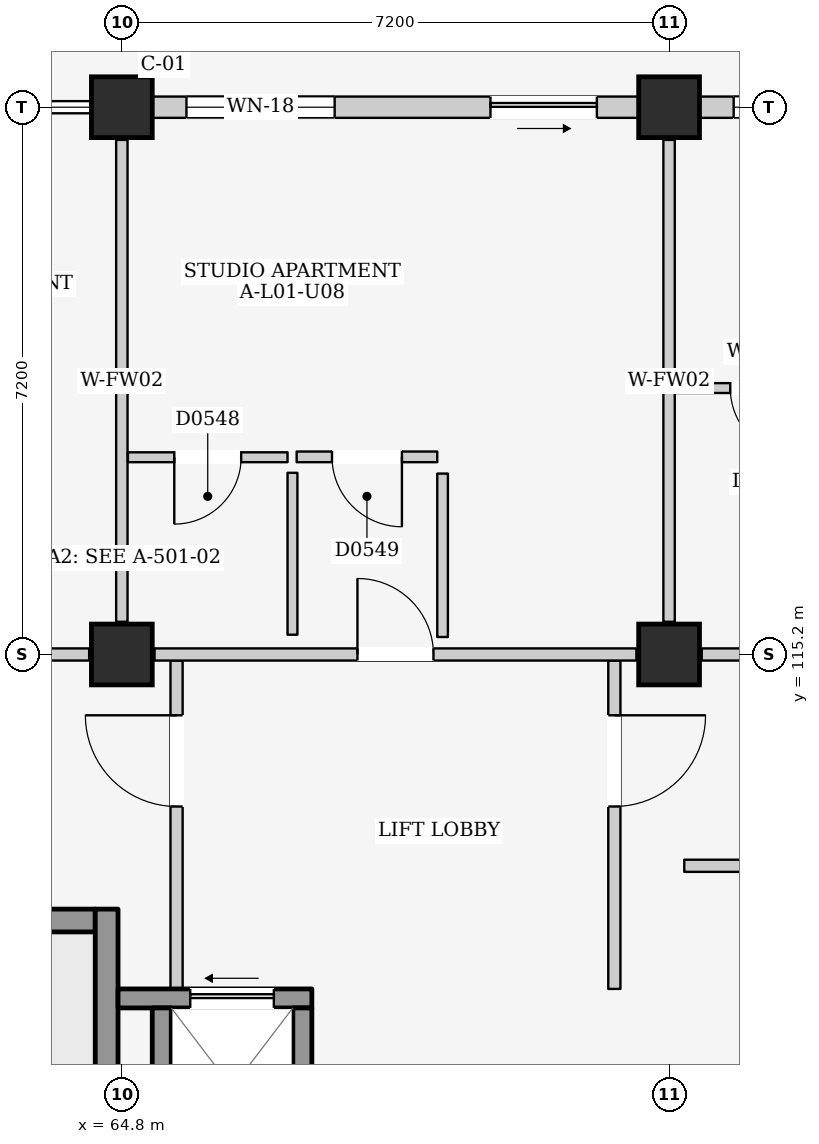
"""IFC4 building model, lengths in metres.
Left out: names, types, materials, properties, quantities, classifications, styles, units other than length and angle.
Written with IfcOpenShell. Run it as: python <this file> out.ifc"""

import sys

from ifc_helpers import new_model, si_unit, direction, frame, frame_2d, origin, origin_2d, place, context, subcontext, project, spatial, rectangle, extrude, element, fill, save


model = new_model("IFC4")
c1 = context("Model", 3, precision=1e-05, world=origin(), true_north=direction((0.0, 1.0)))
c2 = subcontext(c1, "Body", "Model", "MODEL_VIEW")
j1 = project(units=[si_unit("LENGTHUNIT", "METRE"), si_unit("PLANEANGLEUNIT", "RADIAN")], contexts=[c1])
p1 = place(None, origin())
s1 = spatial("IfcSite", under=j1, at=p1, CompositionType="ELEMENT")
p2 = place(p1, origin())
s2 = spatial("IfcBuilding", under=s1, at=p2, CompositionType="ELEMENT")
p3 = place(p2, frame((0.0, 0.0, 4.5)))
s3 = spatial("IfcBuildingStorey", under=s2, at=p3, CompositionType="ELEMENT", Elevation=4.5)
for number, where, z_axis, x_axis in (
    (1, (64.8, 115.2, 0.0), (0.0, 0.0, 1.0), (1.0, 0.0, 0.0)),
    (2, (64.8, 122.4, 0.0), (0.0, 0.0, 1.0), (1.0, 0.0, 0.0)),
    (3, (72.0, 115.2, 0.0), (0.0, 0.0, 1.0), (1.0, 0.0, 0.0)),
    (4, (72.0, 122.4, 0.0), (0.0, 0.0, 1.0), (1.0, 0.0, 0.0)),
):
    element("IfcColumn", number, at=place(p3, frame(where, z_axis=z_axis, x_axis=x_axis)), inside=s3, PredefinedType="COLUMN", context=c2, shape_type="SweptSolid", body=[
        extrude(rectangle(XDim=0.8, YDim=0.8, at=origin_2d()), origin(), (0.0, 0.0, 1.0), 4.5),
    ])
p4 = place(p3, frame((65.2, 122.4, 0.0), z_axis=(0.0, 0.0, 1.0), x_axis=(1.0, 0.0, 0.0)))
e5 = element("IfcWall", 5, at=p4, inside=s3, PredefinedType="ELEMENTEDWALL", context=c2, shape_type="SweptSolid", body=[
    extrude(rectangle(XDim=6.4, YDim=0.28, at=frame_2d((3.2, 0.0))), origin(), (0.0, 0.0, 1.0), 3.715),
])
p5 = place(p4, frame((4.45, 0.0, 0.0)))
e6 = element("IfcOpeningElement", 6, at=p5, cuts=e5, PredefinedType="OPENING", context=c2, shape_type="SweptSolid", body=[
    extrude(rectangle(XDim=1.4, YDim=2.1, at=frame_2d((0.7, 1.05))), frame((0.0, 0.155, 0.0), z_axis=(0.0, -1.0, 0.0), x_axis=(1.0, 0.0, 0.0)), (0.0, 0.0, 1.0), 0.31),
])
p6 = place(p4, frame((0.45, 0.0, 0.9)))
e7 = element("IfcOpeningElement", 7, at=p6, cuts=e5, PredefinedType="OPENING", context=c2, shape_type="SweptSolid", body=[
    extrude(rectangle(XDim=1.95, YDim=1.55, at=frame_2d((0.975, 0.775))), frame((0.0, 0.155, 0.0), z_axis=(0.0, -1.0, 0.0), x_axis=(1.0, 0.0, 0.0)), (0.0, 0.0, 1.0), 0.31),
])
p7 = place(p3, frame((72.4, 122.4, 0.0), z_axis=(0.0, 0.0, 1.0), x_axis=(1.0, 0.0, 0.0)))
e8 = element("IfcWall", 8, at=p7, inside=s3, PredefinedType="ELEMENTEDWALL", context=c2, shape_type="SweptSolid", body=[
    extrude(rectangle(XDim=6.4, YDim=0.28, at=frame_2d((3.2, 0.0))), origin(), (0.0, 0.0, 1.0), 3.715),
])
p8 = place(p7, frame((4.05, 0.0, 0.0)))
e9 = element("IfcOpeningElement", 9, at=p8, cuts=e8, PredefinedType="OPENING", context=c2, shape_type="SweptSolid", body=[
    extrude(rectangle(XDim=1.8, YDim=2.12, at=frame_2d((0.9, 1.06))), frame((0.0, 0.155, 0.0), z_axis=(0.0, -1.0, 0.0), x_axis=(1.0, 0.0, 0.0)), (0.0, 0.0, 1.0), 0.31),
])
p9 = place(p7, frame((0.45, 0.0, 0.9)))
e10 = element("IfcOpeningElement", 10, at=p9, cuts=e8, PredefinedType="OPENING", context=c2, shape_type="SweptSolid", body=[
    extrude(rectangle(XDim=1.65, YDim=1.35, at=frame_2d((0.825, 0.675))), frame((0.0, 0.155, 0.0), z_axis=(0.0, -1.0, 0.0), x_axis=(1.0, 0.0, 0.0)), (0.0, 0.0, 1.0), 0.31),
])
p10 = place(p3, frame((57.95, 111.7, 0.0), z_axis=(0.0, 0.0, 1.0), x_axis=(1.0, 0.0, 0.0)))
e11 = element("IfcWall", 11, at=p10, inside=s3, PredefinedType="SHEAR", context=c2, shape_type="SweptSolid", body=[
    extrude(rectangle(XDim=6.5, YDim=0.3, at=frame_2d((3.25, 0.0))), origin(), (0.0, 0.0, 1.0), 4.25),
])
p11 = place(p10, frame((0.18, 0.0, 0.0)))
e12 = element("IfcOpeningElement", 12, at=p11, cuts=e11, PredefinedType="OPENING", context=c2, shape_type="SweptSolid", body=[
    extrude(rectangle(XDim=1.15, YDim=2.2, at=frame_2d((0.575, 1.1))), frame((0.0, 0.165, 0.0), z_axis=(0.0, -1.0, 0.0), x_axis=(1.0, 0.0, 0.0)), (0.0, 0.0, 1.0), 0.33),
])
p12 = place(p3, frame((64.6, 108.15, 0.0), z_axis=(0.0, 0.0, 1.0), x_axis=(0.0, 1.0, 0.0)))
e13 = element("IfcWall", 13, at=p12, inside=s3, PredefinedType="SHEAR", context=c2, shape_type="SweptSolid", body=[
    extrude(rectangle(XDim=3.7, YDim=0.3, at=frame_2d((1.85, 0.0))), origin(), (0.0, 0.0, 1.0), 4.25),
])
p13 = place(p3, frame((65.52, 110.8, 0.0), z_axis=(0.0, 0.0, 1.0), x_axis=(0.0, 1.0, 0.0)))
e14 = element("IfcWall", 14, at=p13, inside=s3, PredefinedType="PARTITIONING", context=c2, shape_type="SweptSolid", body=[
    extrude(rectangle(XDim=4.32, YDim=0.16, at=frame_2d((2.16, 0.0))), origin(), (0.0, 0.0, 1.0), 4.25),
])
p14 = place(p13, frame((2.4, 0.0, 0.0)))
e15 = element("IfcOpeningElement", 15, at=p14, cuts=e14, PredefinedType="OPENING", context=c2, shape_type="SweptSolid", body=[
    extrude(rectangle(XDim=1.2, YDim=2.2, at=frame_2d((0.6, 1.1))), frame((0.0, 0.095, 0.0), z_axis=(0.0, -1.0, 0.0), x_axis=(1.0, 0.0, 0.0)), (0.0, 0.0, 1.0), 0.19),
])
p15 = place(p3, frame((71.28, 110.8, 0.0), z_axis=(0.0, 0.0, 1.0), x_axis=(0.0, 1.0, 0.0)))
e16 = element("IfcWall", 16, at=p15, inside=s3, PredefinedType="PARTITIONING", context=c2, shape_type="SweptSolid", body=[
    extrude(rectangle(XDim=4.32, YDim=0.16, at=frame_2d((2.16, 0.0))), origin(), (0.0, 0.0, 1.0), 4.25),
])
p16 = place(p15, frame((2.4, 0.0, 0.0)))
e17 = element("IfcOpeningElement", 17, at=p16, cuts=e16, PredefinedType="OPENING", context=c2, shape_type="SweptSolid", body=[
    extrude(rectangle(XDim=1.2, YDim=2.2, at=frame_2d((0.6, 1.1))), frame((0.0, 0.095, 0.0), z_axis=(0.0, -1.0, 0.0), x_axis=(1.0, 0.0, 0.0)), (0.0, 0.0, 1.0), 0.19),
])
p17 = place(p3, frame((64.75, 110.675, 0.0), z_axis=(0.0, 0.0, 1.0), x_axis=(1.0, 0.0, 0.0)))
e18 = element("IfcWall", 18, at=p17, inside=s3, PredefinedType="SHEAR", context=c2, shape_type="SweptSolid", body=[
    extrude(rectangle(XDim=2.55, YDim=0.25, at=frame_2d((1.275, 0.0))), origin(), (0.0, 0.0, 1.0), 4.25),
])
p18 = place(p17, frame((0.95, 0.0, 0.0)))
e19 = element("IfcOpeningElement", 19, at=p18, cuts=e18, PredefinedType="OPENING", context=c2, shape_type="SweptSolid", body=[
    extrude(rectangle(XDim=1.1, YDim=2.15, at=frame_2d((0.55, 1.075))), frame((0.0, 0.14, 0.0), z_axis=(0.0, -1.0, 0.0), x_axis=(1.0, 0.0, 0.0)), (0.0, 0.0, 1.0), 0.28),
])
for number, where, z_axis, x_axis in (
    (20, (65.325, 108.45, 0.0), (0.0, 0.0, 1.0), (0.0, 1.0, 0.0)),
    (21, (67.175, 108.45, 0.0), (0.0, 0.0, 1.0), (0.0, 1.0, 0.0)),
):
    element("IfcWall", number, at=place(p3, frame(where, z_axis=z_axis, x_axis=x_axis)), inside=s3, PredefinedType="SHEAR", context=c2, shape_type="SweptSolid", body=[
        extrude(rectangle(XDim=2.1, YDim=0.25, at=frame_2d((1.05, 0.0))), origin(), (0.0, 0.0, 1.0), 4.25),
    ])
p19 = place(p3, frame((58.03, 115.2, 0.0), z_axis=(0.0, 0.0, 1.0), x_axis=(1.0, 0.0, 0.0)))
e22 = element("IfcWall", 22, at=p19, inside=s3, PredefinedType="PARTITIONING", context=c2, shape_type="SweptSolid", body=[
    extrude(rectangle(XDim=6.34, YDim=0.16, at=frame_2d((3.17, 0.0))), origin(), (0.0, 0.0, 1.0), 3.585),
])
p20 = place(p19, frame((2.67, 0.0, 0.0)))
e23 = element("IfcOpeningElement", 23, at=p20, cuts=e22, PredefinedType="OPENING", context=c2, shape_type="SweptSolid", body=[
    extrude(rectangle(XDim=1.0, YDim=2.15, at=frame_2d((0.5, 1.075))), frame((0.0, 0.095, 0.0), z_axis=(0.0, -1.0, 0.0), x_axis=(1.0, 0.0, 0.0)), (0.0, 0.0, 1.0), 0.19),
])
p21 = place(p3, frame((64.8, 115.63, 0.0), z_axis=(0.0, 0.0, 1.0), x_axis=(0.0, 1.0, 0.0)))
e24 = element("IfcWall", 24, at=p21, inside=s3, PredefinedType="PARTITIONING", context=c2, shape_type="SweptSolid", body=[
    extrude(rectangle(XDim=6.34, YDim=0.15, at=frame_2d((3.17, 0.0))), origin(), (0.0, 0.0, 1.0), 3.685),
])
p22 = place(p3, frame((65.23, 115.2, 0.0), z_axis=(0.0, 0.0, 1.0), x_axis=(1.0, 0.0, 0.0)))
e25 = element("IfcWall", 25, at=p22, inside=s3, PredefinedType="PARTITIONING", context=c2, shape_type="SweptSolid", body=[
    extrude(rectangle(XDim=6.34, YDim=0.16, at=frame_2d((3.17, 0.0))), origin(), (0.0, 0.0, 1.0), 3.585),
])
p23 = place(p22, frame((2.67, 0.0, 0.0)))
e26 = element("IfcOpeningElement", 26, at=p23, cuts=e25, PredefinedType="OPENING", context=c2, shape_type="SweptSolid", body=[
    extrude(rectangle(XDim=1.0, YDim=2.15, at=frame_2d((0.5, 1.075))), frame((0.0, 0.095, 0.0), z_axis=(0.0, -1.0, 0.0), x_axis=(1.0, 0.0, 0.0)), (0.0, 0.0, 1.0), 0.19),
])
p24 = place(p3, frame((72.0, 115.63, 0.0), z_axis=(0.0, 0.0, 1.0), x_axis=(0.0, 1.0, 0.0)))
e27 = element("IfcWall", 27, at=p24, inside=s3, PredefinedType="PARTITIONING", context=c2, shape_type="SweptSolid", body=[
    extrude(rectangle(XDim=6.34, YDim=0.15, at=frame_2d((3.17, 0.0))), origin(), (0.0, 0.0, 1.0), 3.685),
])
p25 = place(p3, frame((64.88, 117.795, 0.0), z_axis=(0.0, 0.0, 1.0), x_axis=(1.0, 0.0, 0.0)))
e28 = element("IfcWall", 28, at=p25, inside=s3, PredefinedType="PARTITIONING", context=c2, shape_type="SweptSolid", body=[
    extrude(rectangle(XDim=2.1, YDim=0.13, at=frame_2d((1.05, 0.0))), origin(), (0.0, 0.0, 1.0), 4.25),
])
p26 = place(p25, frame((0.61, 0.0, 0.0)))
e29 = element("IfcOpeningElement", 29, at=p26, cuts=e28, PredefinedType="OPENING", context=c2, shape_type="SweptSolid", body=[
    extrude(rectangle(XDim=0.88, YDim=2.1, at=frame_2d((0.44, 1.05))), frame((0.0, 0.08, 0.0), z_axis=(0.0, -1.0, 0.0), x_axis=(1.0, 0.0, 0.0)), (0.0, 0.0, 1.0), 0.16),
])
p27 = place(p3, frame((67.045, 115.46, 0.0), z_axis=(0.0, 0.0, 1.0), x_axis=(0.0, 1.0, 0.0)))
e30 = element("IfcWall", 30, at=p27, inside=s3, PredefinedType="PARTITIONING", context=c2, shape_type="SweptSolid", body=[
    extrude(rectangle(XDim=2.13, YDim=0.13, at=frame_2d((1.065, 0.0))), origin(), (0.0, 0.0, 1.0), 4.25),
])
p28 = place(p3, frame((67.1, 117.8, 0.0), z_axis=(0.0, 0.0, 1.0), x_axis=(1.0, 0.0, 0.0)))
e31 = element("IfcWall", 31, at=p28, inside=s3, PredefinedType="PARTITIONING", context=c2, shape_type="SweptSolid", body=[
    extrude(rectangle(XDim=1.85, YDim=0.14, at=frame_2d((0.925, 0.0))), origin(), (0.0, 0.0, 1.0), 4.25),
])
p29 = place(p28, frame((0.465, 0.0, 0.0)))
e32 = element("IfcOpeningElement", 32, at=p29, cuts=e31, PredefinedType="OPENING", context=c2, shape_type="SweptSolid", body=[
    extrude(rectangle(XDim=0.92, YDim=2.1, at=frame_2d((0.46, 1.05))), frame((0.0, 0.085, 0.0), z_axis=(0.0, -1.0, 0.0), x_axis=(1.0, 0.0, 0.0)), (0.0, 0.0, 1.0), 0.17),
])
p30 = place(p3, frame((69.02, 115.43, 0.0), z_axis=(0.0, 0.0, 1.0), x_axis=(0.0, 1.0, 0.0)))
e33 = element("IfcWall", 33, at=p30, inside=s3, PredefinedType="PARTITIONING", context=c2, shape_type="SweptSolid", body=[
    extrude(rectangle(XDim=2.15, YDim=0.14, at=frame_2d((1.075, 0.0))), origin(), (0.0, 0.0, 1.0), 4.25),
])
p31 = place(p3, frame((72.43, 115.2, 0.0), z_axis=(0.0, 0.0, 1.0), x_axis=(1.0, 0.0, 0.0)))
e34 = element("IfcWall", 34, at=p31, inside=s3, PredefinedType="PARTITIONING", context=c2, shape_type="SweptSolid", body=[
    extrude(rectangle(XDim=6.34, YDim=0.16, at=frame_2d((3.17, 0.0))), origin(), (0.0, 0.0, 1.0), 3.585),
])
p32 = place(p31, frame((5.16, 0.0, 0.0)))
e35 = element("IfcOpeningElement", 35, at=p32, cuts=e34, PredefinedType="OPENING", context=c2, shape_type="SweptSolid", body=[
    extrude(rectangle(XDim=1.0, YDim=2.15, at=frame_2d((0.5, 1.075))), frame((0.0, 0.095, 0.0), z_axis=(0.0, -1.0, 0.0), x_axis=(1.0, 0.0, 0.0)), (0.0, 0.0, 1.0), 0.19),
])
p33 = place(p3, frame((72.08, 118.705, 0.0), z_axis=(0.0, 0.0, 1.0), x_axis=(1.0, 0.0, 0.0)))
e36 = element("IfcWall", 36, at=p33, inside=s3, PredefinedType="PARTITIONING", context=c2, shape_type="SweptSolid", body=[
    extrude(rectangle(XDim=2.35, YDim=0.13, at=frame_2d((1.175, 0.0))), origin(), (0.0, 0.0, 1.0), 4.25),
])
p34 = place(p33, frame((0.725, 0.0, 0.0)))
e37 = element("IfcOpeningElement", 37, at=p34, cuts=e36, PredefinedType="OPENING", context=c2, shape_type="SweptSolid", body=[
    extrude(rectangle(XDim=0.9, YDim=2.1, at=frame_2d((0.45, 1.05))), frame((0.0, 0.08, 0.0), z_axis=(0.0, -1.0, 0.0), x_axis=(1.0, 0.0, 0.0)), (0.0, 0.0, 1.0), 0.16),
])
p35 = place(p3, frame((72.2, 112.42, 0.0), z_axis=(0.0, 0.0, 1.0), x_axis=(1.0, 0.0, 0.0)))
e38 = element("IfcWall", 38, at=p35, inside=s3, PredefinedType="PARTITIONING", context=c2, shape_type="SweptSolid", body=[
    extrude(rectangle(XDim=6.8, YDim=0.16, at=frame_2d((3.4, 0.0))), origin(), (0.0, 0.0, 1.0), 4.25),
])
p36 = place(p35, frame((2.93, 0.0, 0.0)))
e39 = element("IfcOpeningElement", 39, at=p36, cuts=e38, PredefinedType="OPENING", context=c2, shape_type="SweptSolid", body=[
    extrude(rectangle(XDim=0.94, YDim=2.12, at=frame_2d((0.47, 1.06))), frame((0.0, 0.095, 0.0), z_axis=(0.0, -1.0, 0.0), x_axis=(1.0, 0.0, 0.0)), (0.0, 0.0, 1.0), 0.19),
])
p37 = place(p5, frame((1.4, 0.0, 0.0), z_axis=(0.0, 0.0, 1.0), x_axis=(-1.0, 0.0, 0.0)))
e40 = element("IfcDoor", 40, at=p37, inside=s3, OperationType="SLIDING_TO_RIGHT", PredefinedType="DOOR", context=c2, shape_type="SweptSolid", body=[
    extrude(rectangle(XDim=1.4, YDim=2.1, at=frame_2d((0.7, 1.05))), frame((0.0, 0.025, 0.0), z_axis=(0.0, -1.0, 0.0), x_axis=(1.0, 0.0, 0.0)), (0.0, 0.0, 1.0), 0.05),
])
fill(e6, e40)
p38 = place(p6, origin())
e41 = element("IfcWindow", 41, at=p38, inside=s3, PartitioningType="DOUBLE_PANEL_VERTICAL", PredefinedType="WINDOW", context=c2, shape_type="SweptSolid", body=[
    extrude(rectangle(XDim=1.95, YDim=1.55, at=frame_2d((0.975, 0.775))), frame((0.0, 0.03, 0.0), z_axis=(0.0, -1.0, 0.0), x_axis=(1.0, 0.0, 0.0)), (0.0, 0.0, 1.0), 0.06),
])
fill(e7, e41)
p39 = place(p9, origin())
e42 = element("IfcWindow", 42, at=p39, inside=s3, PartitioningType="DOUBLE_PANEL_VERTICAL", PredefinedType="WINDOW", context=c2, shape_type="SweptSolid", body=[
    extrude(rectangle(XDim=1.65, YDim=1.35, at=frame_2d((0.825, 0.675))), frame((0.0, 0.03, 0.0), z_axis=(0.0, -1.0, 0.0), x_axis=(1.0, 0.0, 0.0)), (0.0, 0.0, 1.0), 0.06),
])
fill(e10, e42)
p40 = place(p14, origin())
e43 = element("IfcDoor", 43, at=p40, inside=s3, OperationType="SINGLE_SWING_RIGHT", PredefinedType="DOOR", context=c2, shape_type="SweptSolid", body=[
    extrude(rectangle(XDim=1.2, YDim=2.2, at=frame_2d((0.6, 1.1))), frame((0.0, 0.025, 0.0), z_axis=(0.0, -1.0, 0.0), x_axis=(1.0, 0.0, 0.0)), (0.0, 0.0, 1.0), 0.05),
])
fill(e15, e43)
p41 = place(p16, frame((1.2, 0.0, 0.0), z_axis=(0.0, 0.0, 1.0), x_axis=(-1.0, 0.0, 0.0)))
e44 = element("IfcDoor", 44, at=p41, inside=s3, OperationType="SINGLE_SWING_LEFT", PredefinedType="DOOR", context=c2, shape_type="SweptSolid", body=[
    extrude(rectangle(XDim=1.2, YDim=2.2, at=frame_2d((0.6, 1.1))), frame((0.0, 0.025, 0.0), z_axis=(0.0, -1.0, 0.0), x_axis=(1.0, 0.0, 0.0)), (0.0, 0.0, 1.0), 0.05),
])
fill(e17, e44)
p42 = place(p18, origin())
e45 = element("IfcDoor", 45, at=p42, inside=s3, OperationType="SLIDING_TO_LEFT", PredefinedType="DOOR", context=c2, shape_type="SweptSolid", body=[
    extrude(rectangle(XDim=1.1, YDim=2.15, at=frame_2d((0.55, 1.075))), frame((0.0, 0.025, 0.0), z_axis=(0.0, -1.0, 0.0), x_axis=(1.0, 0.0, 0.0)), (0.0, 0.0, 1.0), 0.05),
])
fill(e19, e45)
p43 = place(p23, origin())
e46 = element("IfcDoor", 46, at=p43, inside=s3, OperationType="SINGLE_SWING_LEFT", PredefinedType="DOOR", context=c2, shape_type="SweptSolid", body=[
    extrude(rectangle(XDim=1.0, YDim=2.15, at=frame_2d((0.5, 1.075))), frame((0.0, 0.025, 0.0), z_axis=(0.0, -1.0, 0.0), x_axis=(1.0, 0.0, 0.0)), (0.0, 0.0, 1.0), 0.05),
])
fill(e26, e46)
p44 = place(p26, frame((0.88, 0.0, 0.0), z_axis=(0.0, 0.0, 1.0), x_axis=(-1.0, 0.0, 0.0)))
e47 = element("IfcDoor", 47, at=p44, inside=s3, OperationType="SINGLE_SWING_RIGHT", PredefinedType="DOOR", context=c2, shape_type="SweptSolid", body=[
    extrude(rectangle(XDim=0.88, YDim=2.1, at=frame_2d((0.44, 1.05))), frame((0.0, 0.025, 0.0), z_axis=(0.0, -1.0, 0.0), x_axis=(1.0, 0.0, 0.0)), (0.0, 0.0, 1.0), 0.05),
])
fill(e29, e47)
p45 = place(p29, frame((0.92, 0.0, 0.0), z_axis=(0.0, 0.0, 1.0), x_axis=(-1.0, 0.0, 0.0)))
e48 = element("IfcDoor", 48, at=p45, inside=s3, OperationType="SINGLE_SWING_LEFT", PredefinedType="DOOR", context=c2, shape_type="SweptSolid", body=[
    extrude(rectangle(XDim=0.92, YDim=2.1, at=frame_2d((0.46, 1.05))), frame((0.0, 0.025, 0.0), z_axis=(0.0, -1.0, 0.0), x_axis=(1.0, 0.0, 0.0)), (0.0, 0.0, 1.0), 0.05),
])
fill(e32, e48)
p46 = place(p34, frame((0.9, 0.0, 0.0), z_axis=(0.0, 0.0, 1.0), x_axis=(-1.0, 0.0, 0.0)))
e49 = element("IfcDoor", 49, at=p46, inside=s3, OperationType="SINGLE_SWING_LEFT", PredefinedType="DOOR", context=c2, shape_type="SweptSolid", body=[
    extrude(rectangle(XDim=0.9, YDim=2.1, at=frame_2d((0.45, 1.05))), frame((0.0, 0.025, 0.0), z_axis=(0.0, -1.0, 0.0), x_axis=(1.0, 0.0, 0.0)), (0.0, 0.0, 1.0), 0.05),
])
fill(e37, e49)
save(model, sys.argv[1])
